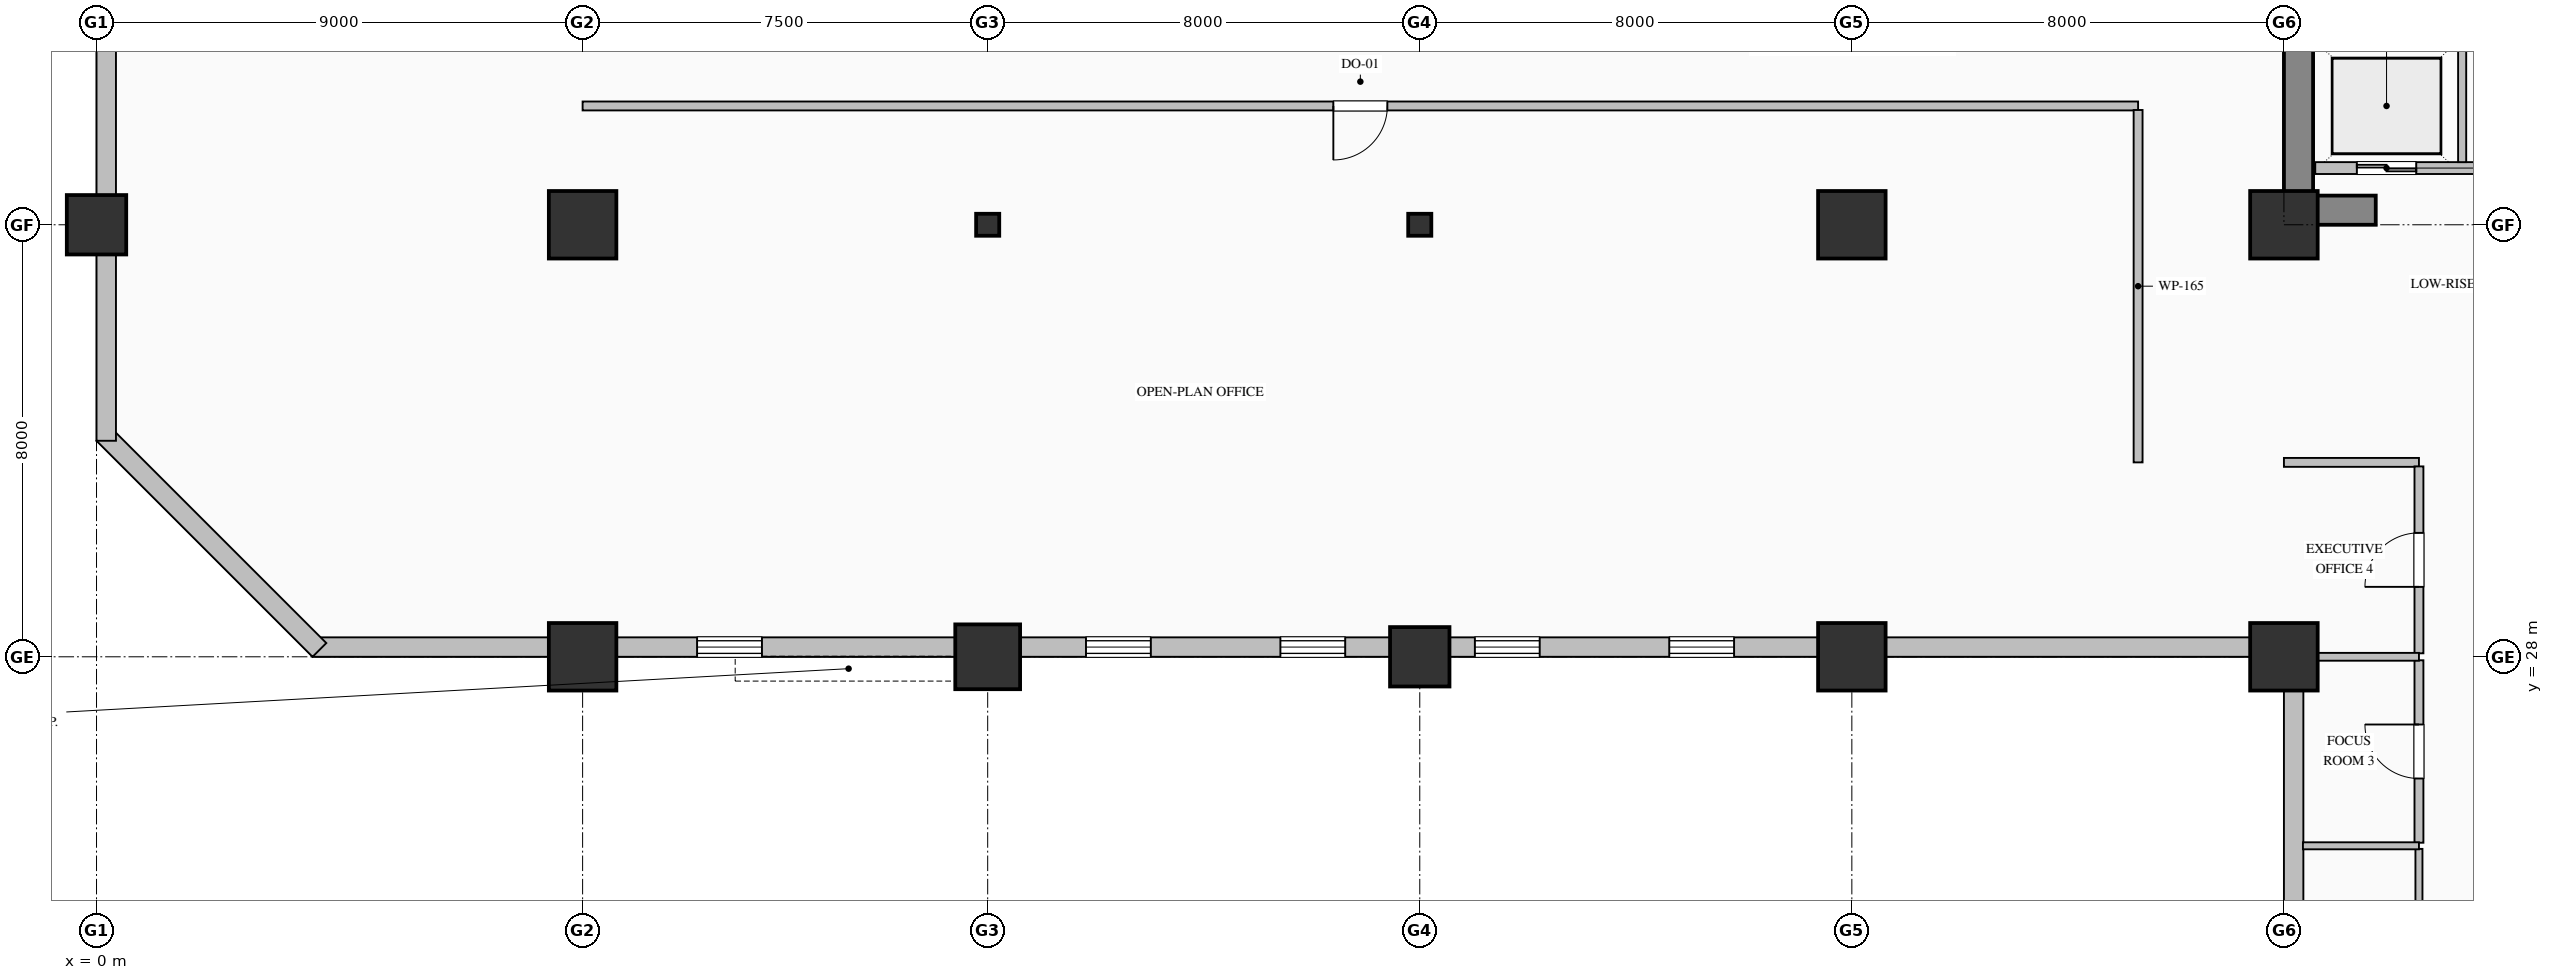
"""IFC4 building model, lengths in metres.
Left out: names, types, materials, properties, quantities, classifications, styles, units other than length and angle.
Written with IfcOpenShell. Run it as: python <this file> out.ifc"""

import sys

from ifc_helpers import new_model, si_unit, direction, frame, frame_2d, origin, origin_2d, place, context, subcontext, project, spatial, rectangle, hollow_rectangle, hollow_circle, i_section, extrude, element, fill, save


model = new_model("IFC4")
c1 = context("Model", 3, precision=1e-05, world=origin(), true_north=direction((0.0, 1.0)))
c2 = subcontext(c1, "Body", "Model", "MODEL_VIEW")
j1 = project(units=[si_unit("LENGTHUNIT", "METRE"), si_unit("PLANEANGLEUNIT", "RADIAN")], contexts=[c1])
p1 = place(None, origin())
s1 = spatial("IfcSite", under=j1, at=p1, CompositionType="ELEMENT")
p2 = place(p1, origin())
s2 = spatial("IfcBuilding", under=s1, at=p2, CompositionType="ELEMENT")
p3 = place(p2, frame((0.0, 0.0, 36.2)))
s3 = spatial("IfcBuildingStorey", under=s2, at=p3, CompositionType="ELEMENT", Elevation=36.2)
p4 = place(p3, frame((40.77, 36.54, 0.0), z_axis=(0.0, 0.0, 1.0), x_axis=(0.0, 1.0, 0.0)))
e1 = element("IfcWall", 1, at=p4, inside=s3, PredefinedType="SHEAR", context=c2, shape_type="SweptSolid", body=[
    extrude(rectangle(XDim=7.86, YDim=0.54, at=frame_2d((3.93, 0.0))), origin(), (0.0, 0.0, 1.0), 3.75),
])
p5 = place(p3, frame((40.5, 36.27, 0.0), z_axis=(0.0, 0.0, 1.0), x_axis=(1.0, 0.0, 0.0)))
e2 = element("IfcWall", 2, at=p5, inside=s3, PredefinedType="SHEAR", context=c2, shape_type="SweptSolid", body=[
    extrude(rectangle(XDim=1.7, YDim=0.54, at=frame_2d((0.85, 0.0))), origin(), (0.0, 0.0, 1.0), 3.75),
])
p6 = place(p3, frame((0.0, 36.0, 0.0), z_axis=(0.0, 0.0, 1.0), x_axis=(1.0, 0.0, 0.0)))
e3 = element("IfcColumn", 3, at=p6, inside=s3, PredefinedType="COLUMN", context=c2, shape_type="SweptSolid", body=[
    extrude(hollow_rectangle(XDim=1.1, YDim=1.1, WallThickness=0.04, at=origin_2d()), origin(), (0.0, 0.0, 1.0), 4.0),
])
for number, where, z_axis, x_axis in (
    (4, (9.0, 28.0, 0.0), (0.0, 0.0, 1.0), (1.0, 0.0, 0.0)),
    (5, (9.0, 36.0, 0.0), (0.0, 0.0, 1.0), (1.0, 0.0, 0.0)),
):
    element("IfcColumn", number, at=place(p3, frame(where, z_axis=z_axis, x_axis=x_axis)), inside=s3, PredefinedType="COLUMN", context=c2, shape_type="SweptSolid", body=[
        extrude(hollow_rectangle(XDim=1.25, YDim=1.25, WallThickness=0.045, at=origin_2d()), origin(), (0.0, 0.0, 1.0), 4.0),
    ])
p7 = place(p3, frame((16.5, 28.0, 0.0), z_axis=(0.0, 0.0, 1.0), x_axis=(1.0, 0.0, 0.0)))
e6 = element("IfcColumn", 6, at=p7, inside=s3, PredefinedType="COLUMN", context=c2, shape_type="SweptSolid", body=[
    extrude(hollow_circle(Radius=0.6, WallThickness=0.04, at=origin_2d()), origin(), (0.0, 0.0, 1.0), 4.0),
])
p8 = place(p3, frame((16.5, 36.0, 0.0), z_axis=(0.0, 0.0, 1.0), x_axis=(1.0, 0.0, 0.0)))
e7 = element("IfcColumn", 7, at=p8, inside=s3, PredefinedType="COLUMN", context=c2, shape_type="SweptSolid", body=[
    extrude(i_section(OverallWidth=0.407, OverallDepth=0.428, WebThickness=0.02, FlangeThickness=0.035, FilletRadius=0.022, at=origin_2d()), origin(), (0.0, 0.0, 1.0), 4.0),
])
p9 = place(p3, frame((24.5, 28.0, 0.0), z_axis=(0.0, 0.0, 1.0), x_axis=(1.0, 0.0, 0.0)))
e8 = element("IfcColumn", 8, at=p9, inside=s3, PredefinedType="COLUMN", context=c2, shape_type="SweptSolid", body=[
    extrude(hollow_rectangle(XDim=1.1, YDim=1.1, WallThickness=0.04, at=origin_2d()), origin(), (0.0, 0.0, 1.0), 4.0),
])
p10 = place(p3, frame((24.5, 36.0, 0.0), z_axis=(0.0, 0.0, 1.0), x_axis=(1.0, 0.0, 0.0)))
e9 = element("IfcColumn", 9, at=p10, inside=s3, PredefinedType="COLUMN", context=c2, shape_type="SweptSolid", body=[
    extrude(i_section(OverallWidth=0.407, OverallDepth=0.428, WebThickness=0.02, FlangeThickness=0.035, FilletRadius=0.022, at=origin_2d()), origin(), (0.0, 0.0, 1.0), 4.0),
])
for number, where, z_axis, x_axis in (
    (10, (32.5, 28.0, 0.0), (0.0, 0.0, 1.0), (1.0, 0.0, 0.0)),
    (11, (32.5, 36.0, 0.0), (0.0, 0.0, 1.0), (1.0, 0.0, 0.0)),
    (12, (40.5, 28.0, 0.0), (0.0, 0.0, 1.0), (1.0, 0.0, 0.0)),
    (13, (40.5, 36.0, 0.0), (0.0, 0.0, 1.0), (1.0, 0.0, 0.0)),
):
    element("IfcColumn", number, at=place(p3, frame(where, z_axis=z_axis, x_axis=x_axis)), inside=s3, PredefinedType="COLUMN", context=c2, shape_type="SweptSolid", body=[
        extrude(hollow_rectangle(XDim=1.25, YDim=1.25, WallThickness=0.045, at=origin_2d()), origin(), (0.0, 0.0, 1.0), 4.0),
    ])
p11 = place(p3, frame((40.68, 8.0, 0.0), z_axis=(0.0, 0.0, 1.0), x_axis=(0.0, 1.0, 0.0)))
e14 = element("IfcWall", 14, at=p11, inside=s3, PredefinedType="SOLIDWALL", context=c2, shape_type="SweptSolid", body=[
    extrude(rectangle(XDim=20.36, YDim=0.36, at=frame_2d((10.18, 0.0))), origin(), (0.0, 0.0, 1.0), 3.05),
])
p12 = place(p11, frame((6.6, 0.0, 0.7)))
e15 = element("IfcOpeningElement", 15, at=p12, cuts=e14, PredefinedType="OPENING", context=c2, shape_type="SweptSolid", body=[
    extrude(rectangle(XDim=1.2, YDim=1.85, at=frame_2d((0.6, 0.925))), frame((0.0, 0.19, 0.0), z_axis=(0.0, -1.0, 0.0), x_axis=(1.0, 0.0, 0.0)), (0.0, 0.0, 1.0), 0.38),
])
p13 = place(p11, frame((13.8, 0.0, 0.7)))
e16 = element("IfcOpeningElement", 16, at=p13, cuts=e14, PredefinedType="OPENING", context=c2, shape_type="SweptSolid", body=[
    extrude(rectangle(XDim=1.2, YDim=1.85, at=frame_2d((0.6, 0.925))), frame((0.0, 0.19, 0.0), z_axis=(0.0, -1.0, 0.0), x_axis=(1.0, 0.0, 0.0)), (0.0, 0.0, 1.0), 0.38),
])
p14 = place(p3, frame((40.52, 28.18, 0.0), z_axis=(0.0, 0.0, 1.0), x_axis=(-1.0, 0.0, 0.0)))
e17 = element("IfcWall", 17, at=p14, inside=s3, PredefinedType="SOLIDWALL", context=c2, shape_type="SweptSolid", body=[
    extrude(rectangle(XDim=36.52, YDim=0.36, at=frame_2d((18.26, 0.0))), origin(), (0.0, 0.0, 1.0), 3.05),
])
p15 = place(p14, frame((10.2, 0.0, 0.7)))
e18 = element("IfcOpeningElement", 18, at=p15, cuts=e17, PredefinedType="OPENING", context=c2, shape_type="SweptSolid", body=[
    extrude(rectangle(XDim=1.2, YDim=1.85, at=frame_2d((0.6, 0.925))), frame((0.0, 0.19, 0.0), z_axis=(0.0, -1.0, 0.0), x_axis=(1.0, 0.0, 0.0)), (0.0, 0.0, 1.0), 0.38),
])
p16 = place(p14, frame((13.8, 0.0, 0.7)))
e19 = element("IfcOpeningElement", 19, at=p16, cuts=e17, PredefinedType="OPENING", context=c2, shape_type="SweptSolid", body=[
    extrude(rectangle(XDim=1.2, YDim=1.85, at=frame_2d((0.6, 0.925))), frame((0.0, 0.19, 0.0), z_axis=(0.0, -1.0, 0.0), x_axis=(1.0, 0.0, 0.0)), (0.0, 0.0, 1.0), 0.38),
])
p17 = place(p14, frame((17.4, 0.0, 0.7)))
e20 = element("IfcOpeningElement", 20, at=p17, cuts=e17, PredefinedType="OPENING", context=c2, shape_type="SweptSolid", body=[
    extrude(rectangle(XDim=1.2, YDim=1.85, at=frame_2d((0.6, 0.925))), frame((0.0, 0.19, 0.0), z_axis=(0.0, -1.0, 0.0), x_axis=(1.0, 0.0, 0.0)), (0.0, 0.0, 1.0), 0.38),
])
p18 = place(p14, frame((21.0, 0.0, 0.7)))
e21 = element("IfcOpeningElement", 21, at=p18, cuts=e17, PredefinedType="OPENING", context=c2, shape_type="SweptSolid", body=[
    extrude(rectangle(XDim=1.2, YDim=1.85, at=frame_2d((0.6, 0.925))), frame((0.0, 0.19, 0.0), z_axis=(0.0, -1.0, 0.0), x_axis=(1.0, 0.0, 0.0)), (0.0, 0.0, 1.0), 0.38),
])
p19 = place(p14, frame((28.2, 0.0, 0.7)))
e22 = element("IfcOpeningElement", 22, at=p19, cuts=e17, PredefinedType="OPENING", context=c2, shape_type="SweptSolid", body=[
    extrude(rectangle(XDim=1.2, YDim=1.85, at=frame_2d((0.6, 0.925))), frame((0.0, 0.19, 0.0), z_axis=(0.0, -1.0, 0.0), x_axis=(1.0, 0.0, 0.0)), (0.0, 0.0, 1.0), 0.38),
])
p20 = place(p3, frame((4.127, 28.127, 0.0), z_axis=(0.0, 0.0, 1.0), x_axis=(-0.707106781187, 0.707106781187, 0.0)))
e23 = element("IfcWall", 23, at=p20, inside=s3, PredefinedType="SOLIDWALL", context=c2, shape_type="SweptSolid", body=[
    extrude(rectangle(XDim=5.657, YDim=0.36, at=frame_2d((2.828, 0.0))), origin(), (0.0, 0.0, 1.0), 3.75),
])
p21 = place(p3, frame((0.18, 32.0, 0.0), z_axis=(0.0, 0.0, 1.0), x_axis=(0.0, 1.0, 0.0)))
e24 = element("IfcWall", 24, at=p21, inside=s3, PredefinedType="SOLIDWALL", context=c2, shape_type="SweptSolid", body=[
    extrude(rectangle(XDim=16.0, YDim=0.36, at=frame_2d((8.0, 0.0))), origin(), (0.0, 0.0, 1.0), 3.25),
])
p22 = place(p3, frame((49.32, 37.05, 0.0), z_axis=(0.0, 0.0, 1.0), x_axis=(-1.0, 0.0, 0.0)))
e25 = element("IfcWall", 25, at=p22, inside=s3, PredefinedType="PARTITIONING", context=c2, shape_type="SweptSolid", body=[
    extrude(rectangle(XDim=8.24, YDim=0.22, at=frame_2d((4.12, 0.0))), origin(), (0.0, 0.0, 1.0), 3.75),
])
p23 = place(p22, frame((6.37, 0.0, 0.0)))
e26 = element("IfcOpeningElement", 26, at=p23, cuts=e25, PredefinedType="OPENING", context=c2, shape_type="SweptSolid", body=[
    extrude(rectangle(XDim=1.1, YDim=2.2, at=frame_2d((0.55, 1.1))), frame((0.0, 0.12, 0.0), z_axis=(0.0, -1.0, 0.0), x_axis=(1.0, 0.0, 0.0)), (0.0, 0.0, 1.0), 0.24),
])
p24 = place(p22, frame((3.57, 0.0, 0.0)))
e27 = element("IfcOpeningElement", 27, at=p24, cuts=e25, PredefinedType="OPENING", context=c2, shape_type="SweptSolid", body=[
    extrude(rectangle(XDim=1.1, YDim=2.2, at=frame_2d((0.55, 1.1))), frame((0.0, 0.12, 0.0), z_axis=(0.0, -1.0, 0.0), x_axis=(1.0, 0.0, 0.0)), (0.0, 0.0, 1.0), 0.24),
])
p25 = place(p22, frame((0.77, 0.0, 0.0)))
e28 = element("IfcOpeningElement", 28, at=p25, cuts=e25, PredefinedType="OPENING", context=c2, shape_type="SweptSolid", body=[
    extrude(rectangle(XDim=1.1, YDim=2.2, at=frame_2d((0.55, 1.1))), frame((0.0, 0.12, 0.0), z_axis=(0.0, -1.0, 0.0), x_axis=(1.0, 0.0, 0.0)), (0.0, 0.0, 1.0), 0.24),
])
p26 = place(p3, frame((43.8, 37.16, 0.0), z_axis=(0.0, 0.0, 1.0), x_axis=(0.0, 1.0, 0.0)))
e29 = element("IfcWall", 29, at=p26, inside=s3, PredefinedType="PARTITIONING", context=c2, shape_type="SweptSolid", body=[
    extrude(rectangle(XDim=2.08, YDim=0.15, at=frame_2d((1.04, 0.0))), origin(), (0.0, 0.0, 1.0), 3.75),
])
p27 = place(p3, frame((37.8, 38.2, 0.0), z_axis=(0.0, 0.0, 1.0), x_axis=(-1.0, 0.0, 0.0)))
e30 = element("IfcWall", 30, at=p27, inside=s3, PredefinedType="PARTITIONING", context=c2, shape_type="SweptSolid", body=[
    extrude(rectangle(XDim=28.8, YDim=0.165, at=frame_2d((14.4, 0.0))), origin(), (0.0, 0.0, 1.0), 3.75),
])
p28 = place(p27, frame((13.9, 0.0, 0.0)))
e31 = element("IfcOpeningElement", 31, at=p28, cuts=e30, PredefinedType="OPENING", context=c2, shape_type="SweptSolid", body=[
    extrude(rectangle(XDim=1.0, YDim=2.15, at=frame_2d((0.5, 1.075))), frame((0.0, 0.093, 0.0), z_axis=(0.0, -1.0, 0.0), x_axis=(1.0, 0.0, 0.0)), (0.0, 0.0, 1.0), 0.185),
])
p29 = place(p3, frame((37.8, 31.6, 0.0), z_axis=(0.0, 0.0, 1.0), x_axis=(0.0, 1.0, 0.0)))
e32 = element("IfcWall", 32, at=p29, inside=s3, PredefinedType="PARTITIONING", context=c2, shape_type="SweptSolid", body=[
    extrude(rectangle(XDim=6.525, YDim=0.165, at=frame_2d((3.263, 0.0))), origin(), (0.0, 0.0, 1.0), 3.75),
])
p30 = place(p3, frame((43.0, 31.6, 0.0), z_axis=(0.0, 0.0, 1.0), x_axis=(-1.0, 0.0, 0.0)))
e33 = element("IfcWall", 33, at=p30, inside=s3, PredefinedType="PARTITIONING", context=c2, shape_type="SweptSolid", body=[
    extrude(rectangle(XDim=2.5, YDim=0.165, at=frame_2d((1.25, 0.0))), origin(), (0.0, 0.0, 1.0), 3.75),
])
p31 = place(p3, frame((43.0, 18.557, 0.0), z_axis=(0.0, 0.0, 1.0), x_axis=(0.0, 1.0, 0.0)))
e34 = element("IfcWall", 34, at=p31, inside=s3, PredefinedType="PARTITIONING", context=c2, shape_type="SweptSolid", body=[
    extrude(rectangle(XDim=5.886, YDim=0.13, at=frame_2d((2.943, 0.0))), origin(), (0.0, 0.0, 1.0), 3.75),
])
p32 = place(p31, frame((2.443, 0.0, 0.0)))
e35 = element("IfcOpeningElement", 35, at=p32, cuts=e34, PredefinedType="OPENING", context=c2, shape_type="SweptSolid", body=[
    extrude(rectangle(XDim=1.0, YDim=2.15, at=frame_2d((0.5, 1.075))), frame((0.0, 0.075, 0.0), z_axis=(0.0, -1.0, 0.0), x_axis=(1.0, 0.0, 0.0)), (0.0, 0.0, 1.0), 0.15),
])
p33 = place(p3, frame((43.0, 24.557, 0.0), z_axis=(0.0, 0.0, 1.0), x_axis=(0.0, 1.0, 0.0)))
e36 = element("IfcWall", 36, at=p33, inside=s3, PredefinedType="PARTITIONING", context=c2, shape_type="SweptSolid", body=[
    extrude(rectangle(XDim=3.379, YDim=0.165, at=frame_2d((1.689, 0.0))), origin(), (0.0, 0.0, 1.0), 3.75),
])
p34 = place(p33, frame((1.189, 0.0, 0.0)))
e37 = element("IfcOpeningElement", 37, at=p34, cuts=e36, PredefinedType="OPENING", context=c2, shape_type="SweptSolid", body=[
    extrude(rectangle(XDim=1.0, YDim=2.15, at=frame_2d((0.5, 1.075))), frame((0.0, 0.093, 0.0), z_axis=(0.0, -1.0, 0.0), x_axis=(1.0, 0.0, 0.0)), (0.0, 0.0, 1.0), 0.185),
])
p35 = place(p3, frame((43.0, 28.064, 0.0), z_axis=(0.0, 0.0, 1.0), x_axis=(0.0, 1.0, 0.0)))
e38 = element("IfcWall", 38, at=p35, inside=s3, PredefinedType="PARTITIONING", context=c2, shape_type="SweptSolid", body=[
    extrude(rectangle(XDim=3.461, YDim=0.165, at=frame_2d((1.73, 0.0))), origin(), (0.0, 0.0, 1.0), 3.75),
])
p36 = place(p35, frame((1.23, 0.0, 0.0)))
e39 = element("IfcOpeningElement", 39, at=p36, cuts=e38, PredefinedType="OPENING", context=c2, shape_type="SweptSolid", body=[
    extrude(rectangle(XDim=1.0, YDim=2.15, at=frame_2d((0.5, 1.075))), frame((0.0, 0.093, 0.0), z_axis=(0.0, -1.0, 0.0), x_axis=(1.0, 0.0, 0.0)), (0.0, 0.0, 1.0), 0.185),
])
p37 = place(p3, frame((40.852, 24.5, 0.0), z_axis=(0.0, 0.0, 1.0), x_axis=(1.0, 0.0, 0.0)))
e40 = element("IfcWall", 40, at=p37, inside=s3, PredefinedType="PARTITIONING", context=c2, shape_type="SweptSolid", body=[
    extrude(rectangle(XDim=2.148, YDim=0.13, at=frame_2d((1.074, 0.0))), origin(), (0.0, 0.0, 1.0), 3.75),
])
p38 = place(p3, frame((40.852, 28.0, 0.0), z_axis=(0.0, 0.0, 1.0), x_axis=(1.0, 0.0, 0.0)))
e41 = element("IfcWall", 41, at=p38, inside=s3, PredefinedType="PARTITIONING", context=c2, shape_type="SweptSolid", body=[
    extrude(rectangle(XDim=2.148, YDim=0.145, at=frame_2d((1.074, 0.0))), origin(), (0.0, 0.0, 1.0), 3.042),
])
p39 = place(p15, origin())
e42 = element("IfcWindow", 42, at=p39, inside=s3, PartitioningType="DOUBLE_PANEL_VERTICAL", PredefinedType="WINDOW", context=c2, shape_type="SweptSolid", body=[
    extrude(rectangle(XDim=1.2, YDim=1.85, at=frame_2d((0.6, 0.925))), frame((0.0, 0.15, 0.0), z_axis=(0.0, -1.0, 0.0), x_axis=(1.0, 0.0, 0.0)), (0.0, 0.0, 1.0), 0.06),
])
fill(e18, e42)
p40 = place(p16, origin())
e43 = element("IfcWindow", 43, at=p40, inside=s3, PartitioningType="DOUBLE_PANEL_VERTICAL", PredefinedType="WINDOW", context=c2, shape_type="SweptSolid", body=[
    extrude(rectangle(XDim=1.2, YDim=1.85, at=frame_2d((0.6, 0.925))), frame((0.0, 0.15, 0.0), z_axis=(0.0, -1.0, 0.0), x_axis=(1.0, 0.0, 0.0)), (0.0, 0.0, 1.0), 0.06),
])
fill(e19, e43)
p41 = place(p17, origin())
e44 = element("IfcWindow", 44, at=p41, inside=s3, PartitioningType="DOUBLE_PANEL_VERTICAL", PredefinedType="WINDOW", context=c2, shape_type="SweptSolid", body=[
    extrude(rectangle(XDim=1.2, YDim=1.85, at=frame_2d((0.6, 0.925))), frame((0.0, 0.15, 0.0), z_axis=(0.0, -1.0, 0.0), x_axis=(1.0, 0.0, 0.0)), (0.0, 0.0, 1.0), 0.06),
])
fill(e20, e44)
p42 = place(p18, origin())
e45 = element("IfcWindow", 45, at=p42, inside=s3, PartitioningType="DOUBLE_PANEL_VERTICAL", PredefinedType="WINDOW", context=c2, shape_type="SweptSolid", body=[
    extrude(rectangle(XDim=1.2, YDim=1.85, at=frame_2d((0.6, 0.925))), frame((0.0, 0.15, 0.0), z_axis=(0.0, -1.0, 0.0), x_axis=(1.0, 0.0, 0.0)), (0.0, 0.0, 1.0), 0.06),
])
fill(e21, e45)
p43 = place(p19, origin())
e46 = element("IfcWindow", 46, at=p43, inside=s3, PartitioningType="DOUBLE_PANEL_VERTICAL", PredefinedType="WINDOW", context=c2, shape_type="SweptSolid", body=[
    extrude(rectangle(XDim=1.2, YDim=1.85, at=frame_2d((0.6, 0.925))), frame((0.0, 0.15, 0.0), z_axis=(0.0, -1.0, 0.0), x_axis=(1.0, 0.0, 0.0)), (0.0, 0.0, 1.0), 0.06),
])
fill(e22, e46)
p44 = place(p23, origin())
e47 = element("IfcDoor", 47, at=p44, inside=s3, OperationType="DOUBLE_DOOR_SLIDING", PredefinedType="DOOR", context=c2, shape_type="SweptSolid", body=[
    extrude(rectangle(XDim=1.1, YDim=2.2, at=frame_2d((0.55, 1.1))), frame((0.0, 0.025, 0.0), z_axis=(0.0, -1.0, 0.0), x_axis=(1.0, 0.0, 0.0)), (0.0, 0.0, 1.0), 0.05),
])
fill(e26, e47)
p45 = place(p28, origin())
e48 = element("IfcDoor", 48, at=p45, inside=s3, OperationType="SINGLE_SWING_RIGHT", PredefinedType="DOOR", context=c2, shape_type="SweptSolid", body=[
    extrude(rectangle(XDim=1.0, YDim=2.15, at=frame_2d((0.5, 1.075))), frame((0.0, 0.025, 0.0), z_axis=(0.0, -1.0, 0.0), x_axis=(1.0, 0.0, 0.0)), (0.0, 0.0, 1.0), 0.05),
])
fill(e31, e48)
p46 = place(p34, origin())
e49 = element("IfcDoor", 49, at=p46, inside=s3, OperationType="SINGLE_SWING_RIGHT", PredefinedType="DOOR", context=c2, shape_type="SweptSolid", body=[
    extrude(rectangle(XDim=1.0, YDim=2.15, at=frame_2d((0.5, 1.075))), frame((0.0, 0.025, 0.0), z_axis=(0.0, -1.0, 0.0), x_axis=(1.0, 0.0, 0.0)), (0.0, 0.0, 1.0), 0.05),
])
fill(e37, e49)
p47 = place(p36, origin())
e50 = element("IfcDoor", 50, at=p47, inside=s3, OperationType="SINGLE_SWING_LEFT", PredefinedType="DOOR", context=c2, shape_type="SweptSolid", body=[
    extrude(rectangle(XDim=1.0, YDim=2.15, at=frame_2d((0.5, 1.075))), frame((0.0, 0.025, 0.0), z_axis=(0.0, -1.0, 0.0), x_axis=(1.0, 0.0, 0.0)), (0.0, 0.0, 1.0), 0.05),
])
fill(e39, e50)
save(model, sys.argv[1])
